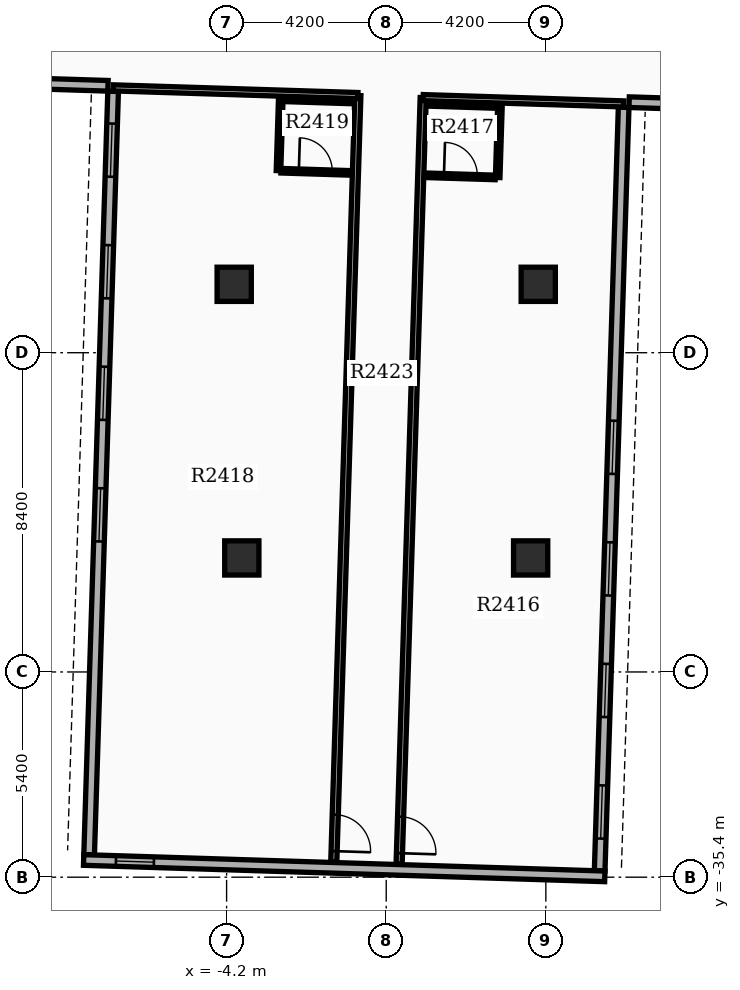
"""IFC4 building model, lengths in metres.
Left out: names, types, materials, properties, quantities, classifications, styles, units other than length and angle.
Written with IfcOpenShell. Run it as: python <this file> out.ifc"""

import sys

from ifc_helpers import new_model, si_unit, direction, frame, frame_2d, origin, origin_2d, place, context, subcontext, project, spatial, rectangle, extrude, element, fill, save


model = new_model("IFC4")
c1 = context("Model", 3, precision=1e-05, world=origin(), true_north=direction((0.0, 1.0)))
c2 = subcontext(c1, "Body", "Model", "MODEL_VIEW")
j1 = project(units=[si_unit("LENGTHUNIT", "METRE"), si_unit("PLANEANGLEUNIT", "RADIAN")], contexts=[c1])
p1 = place(None, origin())
s1 = spatial("IfcSite", under=j1, at=p1, CompositionType="ELEMENT")
p2 = place(p1, origin())
s2 = spatial("IfcBuilding", under=s1, at=p2, CompositionType="ELEMENT")
p3 = place(p2, frame((0.0, 0.0, 152.7)))
s3 = spatial("IfcBuildingStorey", under=s2, at=p3, CompositionType="ELEMENT", Elevation=152.7)
for number, where, z_axis, x_axis in (
    (1, (-4.0, -19.8, 0.0), (0.0, 0.0, 1.0), (1.0, 0.0, 0.0)),
    (2, (4.0, -19.8, 0.0), (0.0, 0.0, 1.0), (1.0, 0.0, 0.0)),
    (3, (-3.8, -27.0, 0.0), (0.0, 0.0, 1.0), (1.0, 0.0, 0.0)),
    (4, (3.8, -27.0, 0.0), (0.0, 0.0, 1.0), (1.0, 0.0, 0.0)),
):
    element("IfcColumn", number, at=place(p3, frame(where, z_axis=z_axis, x_axis=x_axis)), inside=s3, PredefinedType="COLUMN", context=c2, shape_type="SweptSolid", body=[
        extrude(rectangle(XDim=0.9, YDim=0.9, at=origin_2d()), origin(), (0.0, 0.0, 1.0), 3.9),
    ])
p4 = place(p3, frame((-7.186, -14.721, 0.0), z_axis=(0.0, 0.0, 1.0), x_axis=(-0.031410322165, -0.999506574096, 0.0)))
e5 = element("IfcWall", 5, at=p4, inside=s3, PredefinedType="STANDARD", context=c2, shape_type="SweptSolid", body=[
    extrude(rectangle(XDim=20.1, YDim=0.28, at=frame_2d((10.05, 0.0))), origin(), (0.0, 0.0, 1.0), 2.97),
])
p5 = place(p4, frame((0.85, 0.0, 0.8)))
e6 = element("IfcOpeningElement", 6, at=p5, cuts=e5, PredefinedType="OPENING", context=c2, shape_type="SweptSolid", body=[
    extrude(rectangle(XDim=1.4, YDim=1.6, at=frame_2d((0.7, 0.8))), frame((0.0, 0.15, 0.0), z_axis=(0.0, -1.0, 0.0), x_axis=(1.0, 0.0, 0.0)), (0.0, 0.0, 1.0), 0.3),
])
p6 = place(p4, frame((4.05, 0.0, 0.8)))
e7 = element("IfcOpeningElement", 7, at=p6, cuts=e5, PredefinedType="OPENING", context=c2, shape_type="SweptSolid", body=[
    extrude(rectangle(XDim=1.4, YDim=1.6, at=frame_2d((0.7, 0.8))), frame((0.0, 0.15, 0.0), z_axis=(0.0, -1.0, 0.0), x_axis=(1.0, 0.0, 0.0)), (0.0, 0.0, 1.0), 0.3),
])
p7 = place(p4, frame((7.25, 0.0, 0.8)))
e8 = element("IfcOpeningElement", 8, at=p7, cuts=e5, PredefinedType="OPENING", context=c2, shape_type="SweptSolid", body=[
    extrude(rectangle(XDim=1.4, YDim=1.6, at=frame_2d((0.7, 0.8))), frame((0.0, 0.15, 0.0), z_axis=(0.0, -1.0, 0.0), x_axis=(1.0, 0.0, 0.0)), (0.0, 0.0, 1.0), 0.3),
])
p8 = place(p4, frame((10.45, 0.0, 0.8)))
e9 = element("IfcOpeningElement", 9, at=p8, cuts=e5, PredefinedType="OPENING", context=c2, shape_type="SweptSolid", body=[
    extrude(rectangle(XDim=1.4, YDim=1.6, at=frame_2d((0.7, 0.8))), frame((0.0, 0.15, 0.0), z_axis=(0.0, -1.0, 0.0), x_axis=(1.0, 0.0, 0.0)), (0.0, 0.0, 1.0), 0.3),
])
p9 = place(p3, frame((5.616, -35.234, 0.0), z_axis=(0.0, 0.0, 1.0), x_axis=(0.031398187845, 0.999506955354, 0.0)))
e10 = element("IfcWall", 10, at=p9, inside=s3, PredefinedType="STANDARD", context=c2, shape_type="SweptSolid", body=[
    extrude(rectangle(XDim=20.1, YDim=0.28, at=frame_2d((10.05, 0.0))), origin(), (0.0, 0.0, 1.0), 2.97),
])
p10 = place(p9, frame((0.85, 0.0, 0.8)))
e11 = element("IfcOpeningElement", 11, at=p10, cuts=e10, PredefinedType="OPENING", context=c2, shape_type="SweptSolid", body=[
    extrude(rectangle(XDim=1.4, YDim=1.6, at=frame_2d((0.7, 0.8))), frame((0.0, 0.15, 0.0), z_axis=(0.0, -1.0, 0.0), x_axis=(1.0, 0.0, 0.0)), (0.0, 0.0, 1.0), 0.3),
])
p11 = place(p9, frame((4.05, 0.0, 0.8)))
e12 = element("IfcOpeningElement", 12, at=p11, cuts=e10, PredefinedType="OPENING", context=c2, shape_type="SweptSolid", body=[
    extrude(rectangle(XDim=1.4, YDim=1.6, at=frame_2d((0.7, 0.8))), frame((0.0, 0.15, 0.0), z_axis=(0.0, -1.0, 0.0), x_axis=(1.0, 0.0, 0.0)), (0.0, 0.0, 1.0), 0.3),
])
p12 = place(p9, frame((7.25, 0.0, 0.8)))
e13 = element("IfcOpeningElement", 13, at=p12, cuts=e10, PredefinedType="OPENING", context=c2, shape_type="SweptSolid", body=[
    extrude(rectangle(XDim=1.4, YDim=1.6, at=frame_2d((0.7, 0.8))), frame((0.0, 0.15, 0.0), z_axis=(0.0, -1.0, 0.0), x_axis=(1.0, 0.0, 0.0)), (0.0, 0.0, 1.0), 0.3),
])
p13 = place(p9, frame((10.45, 0.0, 0.8)))
e14 = element("IfcOpeningElement", 14, at=p13, cuts=e10, PredefinedType="OPENING", context=c2, shape_type="SweptSolid", body=[
    extrude(rectangle(XDim=1.4, YDim=1.6, at=frame_2d((0.7, 0.8))), frame((0.0, 0.15, 0.0), z_axis=(0.0, -1.0, 0.0), x_axis=(1.0, 0.0, 0.0)), (0.0, 0.0, 1.0), 0.3),
])
p14 = place(p3, frame((-7.962, -34.947, 0.0), z_axis=(0.0, 0.0, 1.0), x_axis=(0.999506679556, -0.031406966164, 0.0)))
e15 = element("IfcWall", 15, at=p14, inside=s3, PredefinedType="STANDARD", context=c2, shape_type="SweptSolid", body=[
    extrude(rectangle(XDim=13.72, YDim=0.28, at=frame_2d((6.86, 0.0))), origin(), (0.0, 0.0, 1.0), 2.97),
])
p15 = place(p14, frame((0.85, 0.0, 0.85)))
e16 = element("IfcOpeningElement", 16, at=p15, cuts=e15, PredefinedType="OPENING", context=c2, shape_type="SweptSolid", body=[
    extrude(rectangle(XDim=1.0, YDim=1.5, at=frame_2d((0.5, 0.75))), frame((0.0, 0.15, 0.0), z_axis=(0.0, -1.0, 0.0), x_axis=(1.0, 0.0, 0.0)), (0.0, 0.0, 1.0), 0.3),
])
p16 = place(p3, frame((-13.618, -14.379, 0.0), z_axis=(0.0, 0.0, 1.0), x_axis=(0.999507224741, -0.031389611199, 0.0)))
e17 = element("IfcWall", 17, at=p16, inside=s3, PredefinedType="STANDARD", context=c2, shape_type="SweptSolid", body=[
    extrude(rectangle(XDim=6.3, YDim=0.28, at=frame_2d((3.15, 0.0))), origin(), (0.0, 0.0, 1.0), 2.97),
])
p17 = place(p3, frame((12.689, -15.206, 0.0), z_axis=(0.0, 0.0, 1.0), x_axis=(-0.999507262922, 0.031388395416, 0.0)))
e18 = element("IfcWall", 18, at=p17, inside=s3, PredefinedType="STANDARD", context=c2, shape_type="SweptSolid", body=[
    extrude(rectangle(XDim=6.3, YDim=0.28, at=frame_2d((3.15, 0.0))), origin(), (0.0, 0.0, 1.0), 2.97),
])
p18 = place(p3, frame((0.973, -14.888, 0.0), z_axis=(0.0, 0.0, 1.0), x_axis=(-0.031416030536, -0.99950639469, 0.0)))
e19 = element("IfcWall", 19, at=p18, inside=s3, PredefinedType="PARTITIONING", context=c2, shape_type="SweptSolid", body=[
    extrude(rectangle(XDim=20.182, YDim=0.16, at=frame_2d((10.091, 0.0))), origin(), (0.0, 0.0, 1.0), 2.96),
])
p19 = place(p18, frame((18.93, 0.0, 0.0)))
e20 = element("IfcOpeningElement", 20, at=p19, cuts=e19, PredefinedType="OPENING", context=c2, shape_type="SweptSolid", body=[
    extrude(rectangle(XDim=0.96, YDim=2.15, at=frame_2d((0.48, 1.075))), frame((0.0, 0.09, 0.0), z_axis=(0.0, -1.0, 0.0), x_axis=(1.0, 0.0, 0.0)), (0.0, 0.0, 1.0), 0.18),
])
p20 = place(p3, frame((0.973, -14.888, 0.0), z_axis=(0.0, 0.0, 1.0), x_axis=(0.99950701053, -0.031396431354, 0.0)))
e21 = element("IfcWall", 21, at=p20, inside=s3, PredefinedType="PARTITIONING", context=c2, shape_type="SweptSolid", body=[
    extrude(rectangle(XDim=5.28, YDim=0.16, at=frame_2d((2.64, 0.0))), origin(), (0.0, 0.0, 1.0), 2.96),
])
p21 = place(p3, frame((1.049, -16.931, 0.0), z_axis=(0.0, 0.0, 1.0), x_axis=(0.999507353951, -0.031385496622, 0.0)))
e22 = element("IfcWall", 22, at=p21, inside=s3, PredefinedType="PARTITIONING", context=c2, shape_type="SweptSolid", body=[
    extrude(rectangle(XDim=1.82, YDim=0.12, at=frame_2d((0.91, 0.0))), origin(), (0.0, 0.0, 1.0), 2.96),
])
p22 = place(p21, frame((0.47, 0.0, 0.0)))
e23 = element("IfcOpeningElement", 23, at=p22, cuts=e22, PredefinedType="OPENING", context=c2, shape_type="SweptSolid", body=[
    extrude(rectangle(XDim=0.88, YDim=2.1, at=frame_2d((0.44, 1.05))), frame((0.0, 0.07, 0.0), z_axis=(0.0, -1.0, 0.0), x_axis=(1.0, 0.0, 0.0)), (0.0, 0.0, 1.0), 0.14),
])
p23 = place(p3, frame((1.108, -15.052, 0.0), z_axis=(0.0, 0.0, 1.0), x_axis=(0.999507221803, -0.031389704724, 0.0)))
e24 = element("IfcWall", 24, at=p23, inside=s3, PredefinedType="PARTITIONING", context=c2, shape_type="SweptSolid", body=[
    extrude(rectangle(XDim=1.82, YDim=0.12, at=frame_2d((0.91, 0.0))), origin(), (0.0, 0.0, 1.0), 2.96),
])
p24 = place(p3, frame((2.992, -15.111, 0.0), z_axis=(0.0, 0.0, 1.0), x_axis=(-0.031295563454, -0.999510173889, 0.0)))
e25 = element("IfcWall", 25, at=p24, inside=s3, PredefinedType="PARTITIONING", context=c2, shape_type="SweptSolid", body=[
    extrude(rectangle(XDim=1.88, YDim=0.12, at=frame_2d((0.94, 0.0))), origin(), (0.0, 0.0, 1.0), 2.96),
])
p25 = place(p3, frame((-0.746, -14.834, 0.0), z_axis=(0.0, 0.0, 1.0), x_axis=(-0.031416030536, -0.99950639469, 0.0)))
e26 = element("IfcWall", 26, at=p25, inside=s3, PredefinedType="PARTITIONING", context=c2, shape_type="SweptSolid", body=[
    extrude(rectangle(XDim=20.182, YDim=0.16, at=frame_2d((10.091, 0.0))), origin(), (0.0, 0.0, 1.0), 2.96),
])
p26 = place(p25, frame((18.93, 0.0, 0.0)))
e27 = element("IfcOpeningElement", 27, at=p26, cuts=e26, PredefinedType="OPENING", context=c2, shape_type="SweptSolid", body=[
    extrude(rectangle(XDim=0.96, YDim=2.15, at=frame_2d((0.48, 1.075))), frame((0.0, 0.09, 0.0), z_axis=(0.0, -1.0, 0.0), x_axis=(1.0, 0.0, 0.0)), (0.0, 0.0, 1.0), 0.18),
])
p27 = place(p3, frame((-0.746, -14.834, 0.0), z_axis=(0.0, 0.0, 1.0), x_axis=(-0.999506028801, 0.031427669178, 0.0)))
e28 = element("IfcWall", 28, at=p27, inside=s3, PredefinedType="PARTITIONING", context=c2, shape_type="SweptSolid", body=[
    extrude(rectangle(XDim=6.44, YDim=0.16, at=frame_2d((3.22, 0.0))), origin(), (0.0, 0.0, 1.0), 2.96),
])
p28 = place(p3, frame((-2.769, -16.811, 0.0), z_axis=(0.0, 0.0, 1.0), x_axis=(0.999507221803, -0.031389704724, 0.0)))
e29 = element("IfcWall", 29, at=p28, inside=s3, PredefinedType="PARTITIONING", context=c2, shape_type="SweptSolid", body=[
    extrude(rectangle(XDim=1.82, YDim=0.12, at=frame_2d((0.91, 0.0))), origin(), (0.0, 0.0, 1.0), 2.96),
])
p29 = place(p28, frame((0.47, 0.0, 0.0)))
e30 = element("IfcOpeningElement", 30, at=p29, cuts=e29, PredefinedType="OPENING", context=c2, shape_type="SweptSolid", body=[
    extrude(rectangle(XDim=0.88, YDim=2.1, at=frame_2d((0.44, 1.05))), frame((0.0, 0.07, 0.0), z_axis=(0.0, -1.0, 0.0), x_axis=(1.0, 0.0, 0.0)), (0.0, 0.0, 1.0), 0.14),
])
p30 = place(p3, frame((-2.71, -14.932, 0.0), z_axis=(0.0, 0.0, 1.0), x_axis=(0.999503004171, -0.03152371574, 0.0)))
e31 = element("IfcWall", 31, at=p30, inside=s3, PredefinedType="PARTITIONING", context=c2, shape_type="SweptSolid", body=[
    extrude(rectangle(XDim=1.82, YDim=0.12, at=frame_2d((0.91, 0.0))), origin(), (0.0, 0.0, 1.0), 2.96),
])
p31 = place(p3, frame((-2.775, -14.93, 0.0), z_axis=(0.0, 0.0, 1.0), x_axis=(-0.031425292588, -0.999506103526, 0.0)))
e32 = element("IfcWall", 32, at=p31, inside=s3, PredefinedType="PARTITIONING", context=c2, shape_type="SweptSolid", body=[
    extrude(rectangle(XDim=1.88, YDim=0.12, at=frame_2d((0.94, 0.0))), origin(), (0.0, 0.0, 1.0), 2.96),
])
p32 = place(p5, origin())
e33 = element("IfcWindow", 33, at=p32, inside=s3, PartitioningType="SINGLE_PANEL", PredefinedType="WINDOW", context=c2, shape_type="SweptSolid", body=[
    extrude(rectangle(XDim=1.4, YDim=1.6, at=frame_2d((0.7, 0.8))), frame((0.0, 0.03, 0.0), z_axis=(0.0, -1.0, 0.0), x_axis=(1.0, 0.0, 0.0)), (0.0, 0.0, 1.0), 0.06),
])
fill(e6, e33)
p33 = place(p6, origin())
e34 = element("IfcWindow", 34, at=p33, inside=s3, PartitioningType="SINGLE_PANEL", PredefinedType="WINDOW", context=c2, shape_type="SweptSolid", body=[
    extrude(rectangle(XDim=1.4, YDim=1.6, at=frame_2d((0.7, 0.8))), frame((0.0, 0.03, 0.0), z_axis=(0.0, -1.0, 0.0), x_axis=(1.0, 0.0, 0.0)), (0.0, 0.0, 1.0), 0.06),
])
fill(e7, e34)
p34 = place(p7, origin())
e35 = element("IfcWindow", 35, at=p34, inside=s3, PartitioningType="SINGLE_PANEL", PredefinedType="WINDOW", context=c2, shape_type="SweptSolid", body=[
    extrude(rectangle(XDim=1.4, YDim=1.6, at=frame_2d((0.7, 0.8))), frame((0.0, 0.03, 0.0), z_axis=(0.0, -1.0, 0.0), x_axis=(1.0, 0.0, 0.0)), (0.0, 0.0, 1.0), 0.06),
])
fill(e8, e35)
p35 = place(p8, origin())
e36 = element("IfcWindow", 36, at=p35, inside=s3, PartitioningType="SINGLE_PANEL", PredefinedType="WINDOW", context=c2, shape_type="SweptSolid", body=[
    extrude(rectangle(XDim=1.4, YDim=1.6, at=frame_2d((0.7, 0.8))), frame((0.0, 0.03, 0.0), z_axis=(0.0, -1.0, 0.0), x_axis=(1.0, 0.0, 0.0)), (0.0, 0.0, 1.0), 0.06),
])
fill(e9, e36)
p36 = place(p10, origin())
e37 = element("IfcWindow", 37, at=p36, inside=s3, PartitioningType="SINGLE_PANEL", PredefinedType="WINDOW", context=c2, shape_type="SweptSolid", body=[
    extrude(rectangle(XDim=1.4, YDim=1.6, at=frame_2d((0.7, 0.8))), frame((0.0, 0.03, 0.0), z_axis=(0.0, -1.0, 0.0), x_axis=(1.0, 0.0, 0.0)), (0.0, 0.0, 1.0), 0.06),
])
fill(e11, e37)
p37 = place(p11, origin())
e38 = element("IfcWindow", 38, at=p37, inside=s3, PartitioningType="SINGLE_PANEL", PredefinedType="WINDOW", context=c2, shape_type="SweptSolid", body=[
    extrude(rectangle(XDim=1.4, YDim=1.6, at=frame_2d((0.7, 0.8))), frame((0.0, 0.03, 0.0), z_axis=(0.0, -1.0, 0.0), x_axis=(1.0, 0.0, 0.0)), (0.0, 0.0, 1.0), 0.06),
])
fill(e12, e38)
p38 = place(p12, origin())
e39 = element("IfcWindow", 39, at=p38, inside=s3, PartitioningType="SINGLE_PANEL", PredefinedType="WINDOW", context=c2, shape_type="SweptSolid", body=[
    extrude(rectangle(XDim=1.4, YDim=1.6, at=frame_2d((0.7, 0.8))), frame((0.0, 0.03, 0.0), z_axis=(0.0, -1.0, 0.0), x_axis=(1.0, 0.0, 0.0)), (0.0, 0.0, 1.0), 0.06),
])
fill(e13, e39)
p39 = place(p13, origin())
e40 = element("IfcWindow", 40, at=p39, inside=s3, PartitioningType="SINGLE_PANEL", PredefinedType="WINDOW", context=c2, shape_type="SweptSolid", body=[
    extrude(rectangle(XDim=1.4, YDim=1.6, at=frame_2d((0.7, 0.8))), frame((0.0, 0.03, 0.0), z_axis=(0.0, -1.0, 0.0), x_axis=(1.0, 0.0, 0.0)), (0.0, 0.0, 1.0), 0.06),
])
fill(e14, e40)
p40 = place(p15, origin())
e41 = element("IfcWindow", 41, at=p40, inside=s3, PartitioningType="SINGLE_PANEL", PredefinedType="WINDOW", context=c2, shape_type="SweptSolid", body=[
    extrude(rectangle(XDim=1.0, YDim=1.5, at=frame_2d((0.5, 0.75))), frame((0.0, 0.03, 0.0), z_axis=(0.0, -1.0, 0.0), x_axis=(1.0, 0.0, 0.0)), (0.0, 0.0, 1.0), 0.06),
])
fill(e16, e41)
p41 = place(p19, origin())
e42 = element("IfcDoor", 42, at=p41, inside=s3, OperationType="SINGLE_SWING_RIGHT", PredefinedType="DOOR", context=c2, shape_type="SweptSolid", body=[
    extrude(rectangle(XDim=0.96, YDim=2.15, at=frame_2d((0.48, 1.075))), frame((0.0, 0.025, 0.0), z_axis=(0.0, -1.0, 0.0), x_axis=(1.0, 0.0, 0.0)), (0.0, 0.0, 1.0), 0.05),
])
fill(e20, e42)
p42 = place(p22, origin())
e43 = element("IfcDoor", 43, at=p42, inside=s3, OperationType="SINGLE_SWING_LEFT", PredefinedType="DOOR", context=c2, shape_type="SweptSolid", body=[
    extrude(rectangle(XDim=0.88, YDim=2.1, at=frame_2d((0.44, 1.05))), frame((0.0, 0.025, 0.0), z_axis=(0.0, -1.0, 0.0), x_axis=(1.0, 0.0, 0.0)), (0.0, 0.0, 1.0), 0.05),
])
fill(e23, e43)
p43 = place(p26, origin())
e44 = element("IfcDoor", 44, at=p43, inside=s3, OperationType="SINGLE_SWING_RIGHT", PredefinedType="DOOR", context=c2, shape_type="SweptSolid", body=[
    extrude(rectangle(XDim=0.96, YDim=2.15, at=frame_2d((0.48, 1.075))), frame((0.0, 0.025, 0.0), z_axis=(0.0, -1.0, 0.0), x_axis=(1.0, 0.0, 0.0)), (0.0, 0.0, 1.0), 0.05),
])
fill(e27, e44)
p44 = place(p29, origin())
e45 = element("IfcDoor", 45, at=p44, inside=s3, OperationType="SINGLE_SWING_LEFT", PredefinedType="DOOR", context=c2, shape_type="SweptSolid", body=[
    extrude(rectangle(XDim=0.88, YDim=2.1, at=frame_2d((0.44, 1.05))), frame((0.0, 0.025, 0.0), z_axis=(0.0, -1.0, 0.0), x_axis=(1.0, 0.0, 0.0)), (0.0, 0.0, 1.0), 0.05),
])
fill(e30, e45)
save(model, sys.argv[1])
